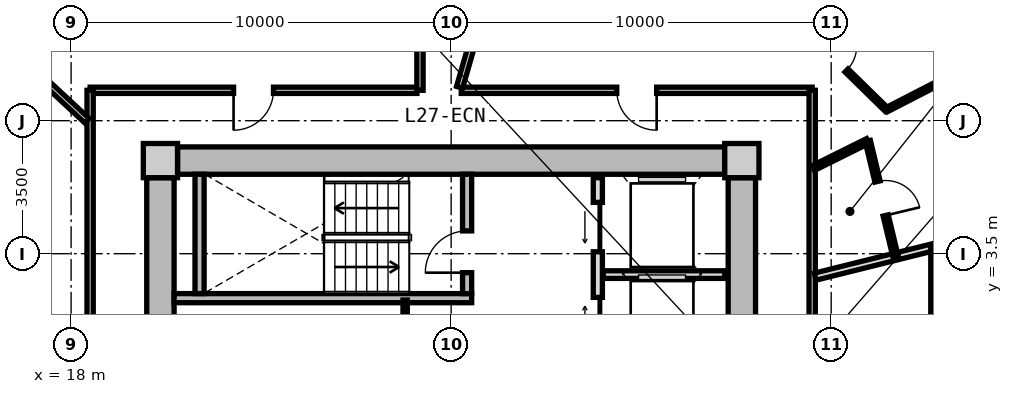
"""IFC4 building model, lengths in metres.
Left out: names, types, materials, properties, quantities, classifications, styles, units other than length and angle.
Written with IfcOpenShell. Run it as: python <this file> out.ifc"""

import sys

from ifc_helpers import new_model, si_unit, direction, frame, frame_2d, origin, origin_2d, place, context, subcontext, project, spatial, rectangle, extrude, source, transform, mapped, element, fill, save


model = new_model("IFC4")
c1 = context("Model", 3, precision=1e-05, world=origin(), true_north=direction((0.0, 1.0)))
c2 = subcontext(c1, "Body", "Model", "MODEL_VIEW")
j1 = project(units=[si_unit("LENGTHUNIT", "METRE"), si_unit("PLANEANGLEUNIT", "RADIAN")], contexts=[c1])
p1 = place(None, origin())
s1 = spatial("IfcSite", under=j1, at=p1, CompositionType="ELEMENT")
p2 = place(p1, origin())
s2 = spatial("IfcBuilding", under=s1, at=p2, CompositionType="ELEMENT")
p3 = place(p2, frame((0.0, 0.0, 90.15)))
s3 = spatial("IfcBuildingStorey", under=s2, at=p3, CompositionType="ELEMENT", Elevation=90.15)
m1 = source(origin(), c2, "Body", "SweptSolid", [
    extrude(rectangle(XDim=0.9, YDim=0.9, at=origin_2d()), origin(), (0.0, 0.0, 1.0), 3.05),
])
for number, where, z_axis, x_axis in (
    (1, (35.65, 5.95, 0.0), (0.0, 0.0, 1.0), (1.0, 0.0, 0.0)),
    (2, (20.35, 5.95, 0.0), (0.0, 0.0, 1.0), (1.0, 0.0, 0.0)),
):
    element("IfcColumn", number, at=place(p3, frame(where, z_axis=z_axis, x_axis=x_axis)), inside=s3, PredefinedType="COLUMN", context=c2, shape_type="MappedRepresentation", body=[
        mapped(m1, transform((0.0, 0.0, 0.0), x_axis=(1.0, 0.0, 0.0), y_axis=(0.0, 1.0, 0.0), z_axis=(0.0, 0.0, 1.0), scale=1.0)),
    ])
m2 = source(origin(), c2, "Body", "SweptSolid", [
    extrude(rectangle(XDim=14.4, YDim=0.72, at=frame_2d((7.2, 0.0))), origin(), (0.0, 0.0, 1.0), 2.79),
])
p4 = place(p3, frame((20.8, 5.95, 0.0), z_axis=(0.0, 0.0, 1.0), x_axis=(1.0, 0.0, 0.0)))
e3 = element("IfcWall", 3, at=p4, inside=s3, PredefinedType="SHEAR", context=c2, shape_type="MappedRepresentation", body=[
    mapped(m2, transform((0.0, 0.0, 0.0), x_axis=(1.0, 0.0, 0.0), y_axis=(0.0, 1.0, 0.0), z_axis=(0.0, 0.0, 1.0), scale=1.0)),
])
m3 = source(origin(), c2, "Body", "SweptSolid", [
    extrude(rectangle(XDim=11.0, YDim=0.72, at=frame_2d((5.5, 0.0))), origin(), (0.0, 0.0, 1.0), 2.79),
])
p5 = place(p3, frame((20.35, -5.5, 0.0), z_axis=(0.0, 0.0, 1.0), x_axis=(0.0, 1.0, 0.0)))
e4 = element("IfcWall", 4, at=p5, inside=s3, PredefinedType="SHEAR", context=c2, shape_type="MappedRepresentation", body=[
    mapped(m3, transform((0.0, 0.0, 0.0), x_axis=(1.0, 0.0, 0.0), y_axis=(0.0, 1.0, 0.0), z_axis=(0.0, 0.0, 1.0), scale=1.0)),
])
p6 = place(p5, frame((3.8, 0.0, 0.0)))
e5 = element("IfcOpeningElement", 5, at=p6, cuts=e4, PredefinedType="OPENING", context=c2, shape_type="SweptSolid", body=[
    extrude(rectangle(XDim=1.2, YDim=2.15, at=frame_2d((0.6, 1.075))), frame((0.0, 0.37, 0.0), z_axis=(0.0, -1.0, 0.0), x_axis=(1.0, 0.0, 0.0)), (0.0, 0.0, 1.0), 0.74),
])
p7 = place(p3, frame((35.65, 5.5, 0.0), z_axis=(0.0, 0.0, 1.0), x_axis=(0.0, -1.0, 0.0)))
e6 = element("IfcWall", 6, at=p7, inside=s3, PredefinedType="SHEAR", context=c2, shape_type="MappedRepresentation", body=[
    mapped(m3, transform((0.0, 0.0, 0.0), x_axis=(1.0, 0.0, 0.0), y_axis=(0.0, 1.0, 0.0), z_axis=(0.0, 0.0, 1.0), scale=1.0)),
])
p8 = place(p7, frame((5.65, 0.0, 0.0)))
e7 = element("IfcOpeningElement", 7, at=p8, cuts=e6, PredefinedType="OPENING", context=c2, shape_type="SweptSolid", body=[
    extrude(rectangle(XDim=1.2, YDim=2.15, at=frame_2d((0.6, 1.075))), frame((0.0, 0.37, 0.0), z_axis=(0.0, -1.0, 0.0), x_axis=(1.0, 0.0, 0.0)), (0.0, 0.0, 1.0), 0.74),
])
m4 = source(origin(), c2, "Body", "SweptSolid", [
    extrude(rectangle(XDim=7.83, YDim=0.24, at=frame_2d((3.915, 0.0))), origin(), (0.0, 0.0, 1.0), 2.79),
])
p9 = place(p3, frame((20.71, 2.33, 0.0), z_axis=(0.0, 0.0, 1.0), x_axis=(1.0, 0.0, 0.0)))
e8 = element("IfcWall", 8, at=p9, inside=s3, PredefinedType="PARTITIONING", context=c2, shape_type="MappedRepresentation", body=[
    mapped(m4, transform((0.0, 0.0, 0.0), x_axis=(1.0, 0.0, 0.0), y_axis=(0.0, 1.0, 0.0), z_axis=(0.0, 0.0, 1.0), scale=1.0)),
])
m5 = source(origin(), c2, "Body", "SweptSolid", [
    extrude(rectangle(XDim=3.14, YDim=0.24, at=frame_2d((1.57, 0.0))), origin(), (0.0, 0.0, 1.0), 2.79),
])
p10 = place(p3, frame((21.38, 2.45, 0.0), z_axis=(0.0, 0.0, 1.0), x_axis=(0.0, 1.0, 0.0)))
e9 = element("IfcWall", 9, at=p10, inside=s3, PredefinedType="PARTITIONING", context=c2, shape_type="MappedRepresentation", body=[
    mapped(m5, transform((0.0, 0.0, 0.0), x_axis=(1.0, 0.0, 0.0), y_axis=(0.0, 1.0, 0.0), z_axis=(0.0, 0.0, 1.0), scale=1.0)),
])
p11 = place(p3, frame((28.42, 2.45, 0.0), z_axis=(0.0, 0.0, 1.0), x_axis=(0.0, 1.0, 0.0)))
e10 = element("IfcWall", 10, at=p11, inside=s3, PredefinedType="PARTITIONING", context=c2, shape_type="MappedRepresentation", body=[
    mapped(m5, transform((0.0, 0.0, 0.0), x_axis=(1.0, 0.0, 0.0), y_axis=(0.0, 1.0, 0.0), z_axis=(0.0, 0.0, 1.0), scale=1.0)),
])
p12 = place(p11, frame((0.55, 0.0, 0.0)))
e11 = element("IfcOpeningElement", 11, at=p12, cuts=e10, PredefinedType="OPENING", context=c2, shape_type="SweptSolid", body=[
    extrude(rectangle(XDim=1.1, YDim=2.15, at=frame_2d((0.55, 1.075))), frame((0.0, 0.13, 0.0), z_axis=(0.0, -1.0, 0.0), x_axis=(1.0, 0.0, 0.0)), (0.0, 0.0, 1.0), 0.26),
])
m6 = source(origin(), c2, "Body", "SweptSolid", [
    extrude(rectangle(XDim=5.0, YDim=0.24, at=frame_2d((2.5, 0.0))), origin(), (0.0, 0.0, 1.0), 2.775),
])
p13 = place(p3, frame((31.86, 0.5, 0.0), z_axis=(0.0, 0.0, 1.0), x_axis=(0.0, 1.0, 0.0)))
e12 = element("IfcWall", 12, at=p13, inside=s3, PredefinedType="PARTITIONING", context=c2, shape_type="MappedRepresentation", body=[
    mapped(m6, transform((0.0, 0.0, 0.0), x_axis=(1.0, 0.0, 0.0), y_axis=(0.0, 1.0, 0.0), z_axis=(0.0, 0.0, 1.0), scale=1.0)),
])
p14 = place(p13, frame((3.05, 0.0, 0.0)))
e13 = element("IfcOpeningElement", 13, at=p14, cuts=e12, PredefinedType="OPENING", context=c2, shape_type="SweptSolid", body=[
    extrude(rectangle(XDim=1.3, YDim=2.2, at=frame_2d((0.65, 1.1))), frame((0.0, 0.13, 0.0), z_axis=(0.0, -1.0, 0.0), x_axis=(1.0, 0.0, 0.0)), (0.0, 0.0, 1.0), 0.26),
])
p15 = place(p13, frame((0.55, 0.0, 0.0)))
e14 = element("IfcOpeningElement", 14, at=p15, cuts=e12, PredefinedType="OPENING", context=c2, shape_type="SweptSolid", body=[
    extrude(rectangle(XDim=1.3, YDim=2.2, at=frame_2d((0.65, 1.1))), frame((0.0, 0.13, 0.0), z_axis=(0.0, -1.0, 0.0), x_axis=(1.0, 0.0, 0.0)), (0.0, 0.0, 1.0), 0.26),
])
m7 = source(origin(), c2, "Body", "SweptSolid", [
    extrude(rectangle(XDim=3.2, YDim=0.2, at=frame_2d((1.6, 0.0))), origin(), (0.0, 0.0, 1.0), 2.775),
])
p16 = place(p3, frame((32.0, 2.95, 0.0), z_axis=(0.0, 0.0, 1.0), x_axis=(1.0, 0.0, 0.0)))
e15 = element("IfcWall", 15, at=p16, inside=s3, PredefinedType="PARTITIONING", context=c2, shape_type="MappedRepresentation", body=[
    mapped(m7, transform((0.0, 0.0, 0.0), x_axis=(1.0, 0.0, 0.0), y_axis=(0.0, 1.0, 0.0), z_axis=(0.0, 0.0, 1.0), scale=1.0)),
])
m8 = source(origin(), c2, "Body", "SweptSolid", [
    extrude(rectangle(XDim=2.33, YDim=0.115, at=frame_2d((1.165, 0.0))), origin(), (0.0, 0.0, 1.0), 2.775),
])
p17 = place(p3, frame((26.79, -0.05, 0.0), z_axis=(0.0, 0.0, 1.0), x_axis=(0.0, 1.0, 0.0)))
e16 = element("IfcWall", 16, at=p17, inside=s3, PredefinedType="PARTITIONING", context=c2, shape_type="MappedRepresentation", body=[
    mapped(m8, transform((0.0, 0.0, 0.0), x_axis=(1.0, 0.0, 0.0), y_axis=(0.0, 1.0, 0.0), z_axis=(0.0, 0.0, 1.0), scale=1.0)),
])
m9 = source(origin(), c2, "Body", "SweptSolid", [
    extrude(rectangle(XDim=8.6, YDim=0.165, at=frame_2d((4.3, 0.0))), origin(), (0.0, 0.0, 1.0), 2.775),
])
p18 = place(p3, frame((18.5, 7.8, 0.0), z_axis=(0.0, 0.0, 1.0), x_axis=(1.0, 0.0, 0.0)))
e17 = element("IfcWall", 17, at=p18, inside=s3, PredefinedType="PARTITIONING", context=c2, shape_type="MappedRepresentation", body=[
    mapped(m9, transform((0.0, 0.0, 0.0), x_axis=(1.0, 0.0, 0.0), y_axis=(0.0, 1.0, 0.0), z_axis=(0.0, 0.0, 1.0), scale=1.0)),
])
p19 = place(p18, frame((3.775, 0.0, 0.0)))
e18 = element("IfcOpeningElement", 18, at=p19, cuts=e17, PredefinedType="OPENING", context=c2, shape_type="SweptSolid", body=[
    extrude(rectangle(XDim=1.05, YDim=2.15, at=frame_2d((0.525, 1.075))), frame((0.0, 0.093, 0.0), z_axis=(0.0, -1.0, 0.0), x_axis=(1.0, 0.0, 0.0)), (0.0, 0.0, 1.0), 0.185),
])
m10 = source(origin(), c2, "Body", "SweptSolid", [
    extrude(rectangle(XDim=9.234, YDim=0.165, at=frame_2d((4.617, 0.0))), origin(), (0.0, 0.0, 1.0), 2.775),
])
p20 = place(p3, frame((28.266, 7.8, 0.0), z_axis=(0.0, 0.0, 1.0), x_axis=(1.0, 0.0, 0.0)))
e19 = element("IfcWall", 19, at=p20, inside=s3, PredefinedType="PARTITIONING", context=c2, shape_type="MappedRepresentation", body=[
    mapped(m10, transform((0.0, 0.0, 0.0), x_axis=(1.0, 0.0, 0.0), y_axis=(0.0, 1.0, 0.0), z_axis=(0.0, 0.0, 1.0), scale=1.0)),
])
p21 = place(p20, frame((4.092, 0.0, 0.0)))
e20 = element("IfcOpeningElement", 20, at=p21, cuts=e19, PredefinedType="OPENING", context=c2, shape_type="SweptSolid", body=[
    extrude(rectangle(XDim=1.05, YDim=2.15, at=frame_2d((0.525, 1.075))), frame((0.0, 0.093, 0.0), z_axis=(0.0, -1.0, 0.0), x_axis=(1.0, 0.0, 0.0)), (0.0, 0.0, 1.0), 0.185),
])
m11 = source(origin(), c2, "Body", "SweptSolid", [
    extrude(rectangle(XDim=15.6, YDim=0.165, at=frame_2d((7.8, 0.0))), origin(), (0.0, 0.0, 1.0), 2.775),
])
p22 = place(p3, frame((18.5, -7.8, 0.0), z_axis=(0.0, 0.0, 1.0), x_axis=(0.0, 1.0, 0.0)))
e21 = element("IfcWall", 21, at=p22, inside=s3, PredefinedType="PARTITIONING", context=c2, shape_type="MappedRepresentation", body=[
    mapped(m11, transform((0.0, 0.0, 0.0), x_axis=(1.0, 0.0, 0.0), y_axis=(0.0, 1.0, 0.0), z_axis=(0.0, 0.0, 1.0), scale=1.0)),
])
p23 = place(p22, frame((7.134, 0.0, 0.0)))
e22 = element("IfcOpeningElement", 22, at=p23, cuts=e21, PredefinedType="OPENING", context=c2, shape_type="SweptSolid", body=[
    extrude(rectangle(XDim=1.25, YDim=2.2, at=frame_2d((0.625, 1.1))), frame((0.0, 0.093, 0.0), z_axis=(0.0, -1.0, 0.0), x_axis=(1.0, 0.0, 0.0)), (0.0, 0.0, 1.0), 0.185),
])
p24 = place(p3, frame((37.5, 7.8, 0.0), z_axis=(0.0, 0.0, 1.0), x_axis=(0.0, -1.0, 0.0)))
e23 = element("IfcWall", 23, at=p24, inside=s3, PredefinedType="PARTITIONING", context=c2, shape_type="MappedRepresentation", body=[
    mapped(m11, transform((0.0, 0.0, 0.0), x_axis=(1.0, 0.0, 0.0), y_axis=(0.0, 1.0, 0.0), z_axis=(0.0, 0.0, 1.0), scale=1.0)),
])
p25 = place(p24, frame((9.177, 0.0, 0.0)))
e24 = element("IfcOpeningElement", 24, at=p25, cuts=e23, PredefinedType="OPENING", context=c2, shape_type="SweptSolid", body=[
    extrude(rectangle(XDim=1.05, YDim=2.15, at=frame_2d((0.525, 1.075))), frame((0.0, 0.093, 0.0), z_axis=(0.0, -1.0, 0.0), x_axis=(1.0, 0.0, 0.0)), (0.0, 0.0, 1.0), 0.185),
])
m12 = source(origin(), c2, "Body", "SweptSolid", [
    extrude(rectangle(XDim=8.989, YDim=0.165, at=frame_2d((4.495, 0.0))), origin(), (0.0, 0.0, 1.0), 2.275),
])
p26 = place(p3, frame((28.222, 7.88, 0.0), z_axis=(0.0, 0.0, 1.0), x_axis=(0.27702323008, 0.960863221274, 0.0)))
e25 = element("IfcWall", 25, at=p26, inside=s3, PredefinedType="PARTITIONING", context=c2, shape_type="MappedRepresentation", body=[
    mapped(m12, transform((0.0, 0.0, 0.0), x_axis=(1.0, 0.0, 0.0), y_axis=(0.0, 1.0, 0.0), z_axis=(0.0, 0.0, 1.0), scale=1.0)),
])
m13 = source(origin(), c2, "Body", "SweptSolid", [
    extrude(rectangle(XDim=7.482, YDim=0.165, at=frame_2d((3.741, 0.0))), origin(), (0.0, 0.0, 1.0), 2.275),
])
p27 = place(p3, frame((18.42, 6.998, 0.0), z_axis=(0.0, 0.0, 1.0), x_axis=(-0.732508698043, 0.680757671489, 0.0)))
e26 = element("IfcWall", 26, at=p27, inside=s3, PredefinedType="PARTITIONING", context=c2, shape_type="MappedRepresentation", body=[
    mapped(m13, transform((0.0, 0.0, 0.0), x_axis=(1.0, 0.0, 0.0), y_axis=(0.0, 1.0, 0.0), z_axis=(0.0, 0.0, 1.0), scale=1.0)),
])
m14 = source(origin(), c2, "Body", "SweptSolid", [
    extrude(rectangle(XDim=7.56, YDim=0.165, at=frame_2d((3.78, 0.0))), origin(), (0.0, 0.0, 1.0), 2.775),
])
p28 = place(p3, frame((27.18, 7.8, 0.0), z_axis=(0.0, 0.0, 1.0), x_axis=(0.0, 1.0, 0.0)))
e27 = element("IfcWall", 27, at=p28, inside=s3, PredefinedType="PARTITIONING", context=c2, shape_type="MappedRepresentation", body=[
    mapped(m14, transform((0.0, 0.0, 0.0), x_axis=(1.0, 0.0, 0.0), y_axis=(0.0, 1.0, 0.0), z_axis=(0.0, 0.0, 1.0), scale=1.0)),
])
m15 = source(origin(), c2, "Body", "SweptSolid", [
    extrude(rectangle(XDim=6.331, YDim=0.19, at=frame_2d((3.165, 0.0))), origin(), (0.0, 0.0, 1.0), 2.275),
])
p29 = place(p3, frame((37.58, 2.896, 0.0), z_axis=(0.0, 0.0, 1.0), x_axis=(0.97036440661, 0.241646267062, 0.0)))
e28 = element("IfcWall", 28, at=p29, inside=s3, PredefinedType="PARTITIONING", context=c2, shape_type="MappedRepresentation", body=[
    mapped(m15, transform((0.0, 0.0, 0.0), x_axis=(1.0, 0.0, 0.0), y_axis=(0.0, 1.0, 0.0), z_axis=(0.0, 0.0, 1.0), scale=1.0)),
])
m16 = source(origin(), c2, "Body", "SweptSolid", [
    extrude(rectangle(XDim=7.375, YDim=0.115, at=frame_2d((3.688, 0.0))), origin(), (0.0, 0.0, 1.0), 2.775),
])
p30 = place(p3, frame((40.678, -3.688, 0.0), z_axis=(0.0, 0.0, 1.0), x_axis=(0.0, 1.0, 0.0)))
e29 = element("IfcWall", 29, at=p30, inside=s3, PredefinedType="PARTITIONING", context=c2, shape_type="MappedRepresentation", body=[
    mapped(m16, transform((0.0, 0.0, 0.0), x_axis=(1.0, 0.0, 0.0), y_axis=(0.0, 1.0, 0.0), z_axis=(0.0, 0.0, 1.0), scale=1.0)),
])
p31 = place(p30, frame((3.213, 0.0, 0.0)))
e30 = element("IfcOpeningElement", 30, at=p31, cuts=e29, PredefinedType="OPENING", context=c2, shape_type="SweptSolid", body=[
    extrude(rectangle(XDim=0.95, YDim=2.1, at=frame_2d((0.475, 1.05))), frame((0.0, 0.067, 0.0), z_axis=(0.0, -1.0, 0.0), x_axis=(1.0, 0.0, 0.0)), (0.0, 0.0, 1.0), 0.135),
])
m17 = source(origin(), c2, "Body", "SweptSolid", [
    extrude(rectangle(XDim=1.6, YDim=0.14, at=frame_2d((0.8, 0.0))), origin(), (0.0, 0.0, 1.0), 2.775),
])
p32 = place(p3, frame((37.53, 5.754, 0.0), z_axis=(0.0, 0.0, 1.0), x_axis=(0.895522919837, 0.445015393044, 0.0)))
e31 = element("IfcWall", 31, at=p32, inside=s3, PredefinedType="PARTITIONING", context=c2, shape_type="MappedRepresentation", body=[
    mapped(m17, transform((0.0, 0.0, 0.0), x_axis=(1.0, 0.0, 0.0), y_axis=(0.0, 1.0, 0.0), z_axis=(0.0, 0.0, 1.0), scale=1.0)),
])
m18 = source(origin(), c2, "Body", "SweptSolid", [
    extrude(rectangle(XDim=3.112, YDim=0.14, at=frame_2d((1.556, 0.0))), origin(), (0.0, 0.0, 1.0), 2.415),
])
p33 = place(p3, frame((38.963, 6.466, 0.0), z_axis=(0.0, 0.0, 1.0), x_axis=(0.233737944029, -0.972299631555, 0.0)))
e32 = element("IfcWall", 32, at=p33, inside=s3, PredefinedType="PARTITIONING", context=c2, shape_type="MappedRepresentation", body=[
    mapped(m18, transform((0.0, 0.0, 0.0), x_axis=(1.0, 0.0, 0.0), y_axis=(0.0, 1.0, 0.0), z_axis=(0.0, 0.0, 1.0), scale=1.0)),
])
p34 = place(p33, frame((1.096, 0.0, 0.0)))
e33 = element("IfcOpeningElement", 33, at=p34, cuts=e32, PredefinedType="OPENING", context=c2, shape_type="SweptSolid", body=[
    extrude(rectangle(XDim=0.92, YDim=2.1, at=frame_2d((0.46, 1.05))), frame((0.0, 0.08, 0.0), z_axis=(0.0, -1.0, 0.0), x_axis=(1.0, 0.0, 0.0)), (0.0, 0.0, 1.0), 0.16),
])
m19 = source(origin(), c2, "Body", "SweptSolid", [
    extrude(rectangle(XDim=2.117, YDim=0.115, at=frame_2d((1.059, 0.0))), origin(), (0.0, 0.0, 1.0), 2.775),
])
p35 = place(p3, frame((39.46, 7.289, 0.0), z_axis=(0.0, 0.0, 1.0), x_axis=(0.888941834945, 0.45802010227, 0.0)))
e34 = element("IfcWall", 34, at=p35, inside=s3, PredefinedType="PARTITIONING", context=c2, shape_type="MappedRepresentation", body=[
    mapped(m19, transform((0.0, 0.0, 0.0), x_axis=(1.0, 0.0, 0.0), y_axis=(0.0, 1.0, 0.0), z_axis=(0.0, 0.0, 1.0), scale=1.0)),
])
m20 = source(origin(), c2, "Body", "SweptSolid", [
    extrude(rectangle(XDim=3.902, YDim=0.115, at=frame_2d((1.951, 0.0))), origin(), (0.0, 0.0, 1.0), 2.775),
])
p36 = place(p3, frame((39.46, 7.289, 0.0), z_axis=(0.0, 0.0, 1.0), x_axis=(-0.714853061854, 0.699274695637, 0.0)))
e35 = element("IfcWall", 35, at=p36, inside=s3, PredefinedType="PARTITIONING", context=c2, shape_type="MappedRepresentation", body=[
    mapped(m20, transform((0.0, 0.0, 0.0), x_axis=(1.0, 0.0, 0.0), y_axis=(0.0, 1.0, 0.0), z_axis=(0.0, 0.0, 1.0), scale=1.0)),
])
p37 = place(p36, frame((1.476, 0.0, 0.0)))
e36 = element("IfcOpeningElement", 36, at=p37, cuts=e35, PredefinedType="OPENING", context=c2, shape_type="SweptSolid", body=[
    extrude(rectangle(XDim=0.95, YDim=2.1, at=frame_2d((0.475, 1.05))), frame((0.0, 0.067, 0.0), z_axis=(0.0, -1.0, 0.0), x_axis=(1.0, 0.0, 0.0)), (0.0, 0.0, 1.0), 0.135),
])
m21 = source(origin(), c2, "Body", "SweptSolid", [
    extrude(rectangle(XDim=1.1, YDim=2.15, at=frame_2d((0.55, 1.075))), frame((0.0, 0.025, 0.0), z_axis=(0.0, -1.0, 0.0), x_axis=(1.0, 0.0, 0.0)), (0.0, 0.0, 1.0), 0.05),
])
p38 = place(p12, origin())
e37 = element("IfcDoor", 37, at=p38, inside=s3, OperationType="SINGLE_SWING_LEFT", PredefinedType="DOOR", context=c2, shape_type="MappedRepresentation", body=[
    mapped(m21, transform((0.0, 0.0, 0.0), x_axis=(1.0, 0.0, 0.0), y_axis=(0.0, 1.0, 0.0), z_axis=(0.0, 0.0, 1.0), scale=1.0)),
])
fill(e11, e37)
m22 = source(origin(), c2, "Body", "SweptSolid", [
    extrude(rectangle(XDim=1.3, YDim=2.2, at=frame_2d((0.65, 1.1))), frame((0.0, 0.025, 0.0), z_axis=(0.0, -1.0, 0.0), x_axis=(1.0, 0.0, 0.0)), (0.0, 0.0, 1.0), 0.05),
])
p39 = place(p14, origin())
e38 = element("IfcDoor", 38, at=p39, inside=s3, OperationType="SLIDING_TO_LEFT", PredefinedType="DOOR", context=c2, shape_type="MappedRepresentation", body=[
    mapped(m22, transform((0.0, 0.0, 0.0), x_axis=(1.0, 0.0, 0.0), y_axis=(0.0, 1.0, 0.0), z_axis=(0.0, 0.0, 1.0), scale=1.0)),
])
fill(e13, e38)
p40 = place(p15, origin())
e39 = element("IfcDoor", 39, at=p40, inside=s3, OperationType="SLIDING_TO_RIGHT", PredefinedType="DOOR", context=c2, shape_type="MappedRepresentation", body=[
    mapped(m22, transform((0.0, 0.0, 0.0), x_axis=(1.0, 0.0, 0.0), y_axis=(0.0, 1.0, 0.0), z_axis=(0.0, 0.0, 1.0), scale=1.0)),
])
fill(e14, e39)
m23 = source(origin(), c2, "Body", "SweptSolid", [
    extrude(rectangle(XDim=1.05, YDim=2.15, at=frame_2d((0.525, 1.075))), frame((0.0, 0.025, 0.0), z_axis=(0.0, -1.0, 0.0), x_axis=(1.0, 0.0, 0.0)), (0.0, 0.0, 1.0), 0.05),
])
p41 = place(p19, frame((1.05, 0.0, 0.0), z_axis=(0.0, 0.0, 1.0), x_axis=(-1.0, 0.0, 0.0)))
e40 = element("IfcDoor", 40, at=p41, inside=s3, OperationType="SINGLE_SWING_RIGHT", PredefinedType="DOOR", context=c2, shape_type="MappedRepresentation", body=[
    mapped(m23, transform((0.0, 0.0, 0.0), x_axis=(1.0, 0.0, 0.0), y_axis=(0.0, 1.0, 0.0), z_axis=(0.0, 0.0, 1.0), scale=1.0)),
])
fill(e18, e40)
p42 = place(p21, frame((1.05, 0.0, 0.0), z_axis=(0.0, 0.0, 1.0), x_axis=(-1.0, 0.0, 0.0)))
e41 = element("IfcDoor", 41, at=p42, inside=s3, OperationType="SINGLE_SWING_LEFT", PredefinedType="DOOR", context=c2, shape_type="MappedRepresentation", body=[
    mapped(m23, transform((0.0, 0.0, 0.0), x_axis=(1.0, 0.0, 0.0), y_axis=(0.0, 1.0, 0.0), z_axis=(0.0, 0.0, 1.0), scale=1.0)),
])
fill(e20, e41)
m24 = source(origin(), c2, "Body", "SweptSolid", [
    extrude(rectangle(XDim=0.92, YDim=2.1, at=frame_2d((0.46, 1.05))), frame((0.0, 0.025, 0.0), z_axis=(0.0, -1.0, 0.0), x_axis=(1.0, 0.0, 0.0)), (0.0, 0.0, 1.0), 0.05),
])
p43 = place(p34, origin())
e42 = element("IfcDoor", 42, at=p43, inside=s3, OperationType="SINGLE_SWING_RIGHT", PredefinedType="DOOR", context=c2, shape_type="MappedRepresentation", body=[
    mapped(m24, transform((0.0, 0.0, 0.0), x_axis=(1.0, 0.0, 0.0), y_axis=(0.0, 1.0, 0.0), z_axis=(0.0, 0.0, 1.0), scale=1.0)),
])
fill(e33, e42)
m25 = source(origin(), c2, "Body", "SweptSolid", [
    extrude(rectangle(XDim=0.95, YDim=2.1, at=frame_2d((0.475, 1.05))), frame((0.0, 0.025, 0.0), z_axis=(0.0, -1.0, 0.0), x_axis=(1.0, 0.0, 0.0)), (0.0, 0.0, 1.0), 0.05),
])
p44 = place(p37, frame((0.95, 0.0, 0.0), z_axis=(0.0, 0.0, 1.0), x_axis=(-1.0, 0.0, 0.0)))
e43 = element("IfcDoor", 43, at=p44, inside=s3, OperationType="SINGLE_SWING_LEFT", PredefinedType="DOOR", context=c2, shape_type="MappedRepresentation", body=[
    mapped(m25, transform((0.0, 0.0, 0.0), x_axis=(1.0, 0.0, 0.0), y_axis=(0.0, 1.0, 0.0), z_axis=(0.0, 0.0, 1.0), scale=1.0)),
])
fill(e36, e43)
save(model, sys.argv[1])
